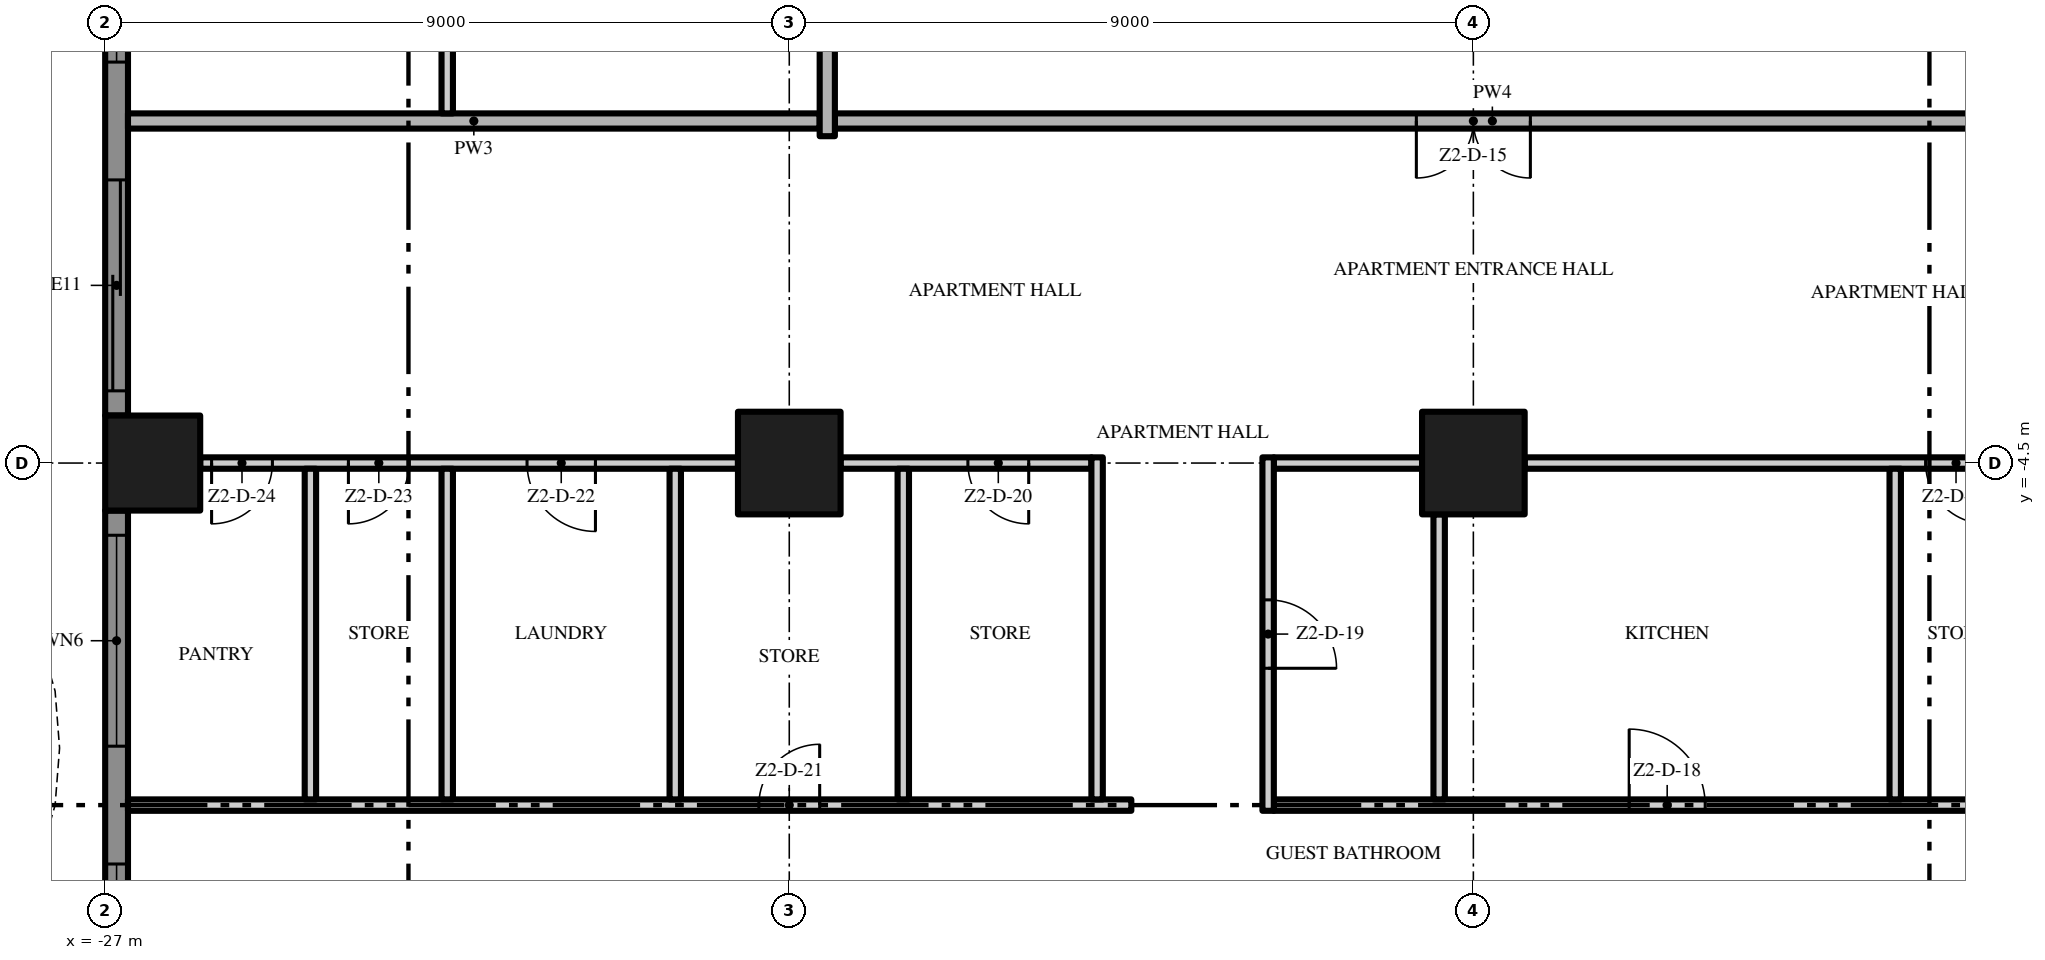
"""IFC4 building model, lengths in metres.
Left out: names, types, materials, properties, quantities, classifications, styles, units other than length and angle.
Written with IfcOpenShell. Run it as: python <this file> out.ifc"""

import sys

from ifc_helpers import new_model, si_unit, direction, frame, frame_2d, origin, origin_2d, place, context, subcontext, project, spatial, polyline, rectangle, outline, extrude, element, fill, save


model = new_model("IFC4")
c1 = context("Model", 3, precision=1e-05, world=origin(), true_north=direction((0.0, 1.0)))
c2 = subcontext(c1, "Body", "Model", "MODEL_VIEW")
j1 = project(units=[si_unit("LENGTHUNIT", "METRE"), si_unit("PLANEANGLEUNIT", "RADIAN")], contexts=[c1])
p1 = place(None, origin())
s1 = spatial("IfcSite", under=j1, at=p1, CompositionType="ELEMENT")
p2 = place(p1, origin())
s2 = spatial("IfcBuilding", under=s1, at=p2, CompositionType="ELEMENT")
p3 = place(p2, frame((0.0, 0.0, 107.4)))
s3 = spatial("IfcBuildingStorey", under=s2, at=p3, CompositionType="ELEMENT", Elevation=107.4)
p4 = place(p3, frame((-18.0, -4.5, 0.0), z_axis=(0.0, 0.0, 1.0), x_axis=(1.0, 0.0, 0.0)))
e1 = element("IfcColumn", 1, at=p4, inside=s3, PredefinedType="COLUMN", context=c2, shape_type="SweptSolid", body=[
    extrude(rectangle(XDim=1.35, YDim=1.35, at=origin_2d()), origin(), (0.0, 0.0, 1.0), 3.5),
])
p5 = place(p3, frame((-26.375, -4.5, 0.0), z_axis=(0.0, 0.0, 1.0), x_axis=(1.0, 0.0, 0.0)))
e2 = element("IfcColumn", 2, at=p5, inside=s3, PredefinedType="COLUMN", context=c2, shape_type="SweptSolid", body=[
    extrude(rectangle(XDim=1.25, YDim=1.25, at=origin_2d()), origin(), (0.0, 0.0, 1.0), 3.5),
])
p6 = place(p3, frame((-9.0, -4.5, 0.0), z_axis=(0.0, 0.0, 1.0), x_axis=(1.0, 0.0, 0.0)))
e3 = element("IfcColumn", 3, at=p6, inside=s3, PredefinedType="COLUMN", context=c2, shape_type="SweptSolid", body=[
    extrude(rectangle(XDim=1.35, YDim=1.35, at=origin_2d()), origin(), (0.0, 0.0, 1.0), 3.5),
])
p7 = place(p3, frame((-26.85, -3.875, 0.0), z_axis=(0.0, 0.0, 1.0), x_axis=(0.0, 1.0, 0.0)))
e4 = element("IfcWall", 4, at=p7, inside=s3, PredefinedType="SOLIDWALL", context=c2, shape_type="SweptSolid", body=[
    extrude(rectangle(XDim=7.75, YDim=0.3, at=frame_2d((3.875, 0.0))), origin(), (0.0, 0.0, 1.0), 3.5),
])
p8 = place(p7, frame((4.65, 0.0, 0.45)))
e5 = element("IfcOpeningElement", 5, at=p8, cuts=e4, PredefinedType="OPENING", context=c2, shape_type="SweptSolid", body=[
    extrude(rectangle(XDim=2.775, YDim=2.65, at=frame_2d((1.387, 1.325))), frame((0.0, 0.16, 0.0), z_axis=(0.0, -1.0, 0.0), x_axis=(1.0, 0.0, 0.0)), (0.0, 0.0, 1.0), 0.32),
])
p9 = place(p7, frame((0.325, 0.0, 0.0)))
e6 = element("IfcOpeningElement", 6, at=p9, cuts=e4, PredefinedType="OPENING", context=c2, shape_type="SweptSolid", body=[
    extrude(rectangle(XDim=2.775, YDim=2.4, at=frame_2d((1.387, 1.2))), frame((0.0, 0.16, 0.0), z_axis=(0.0, -1.0, 0.0), x_axis=(1.0, 0.0, 0.0)), (0.0, 0.0, 1.0), 0.32),
])
p10 = place(p3, frame((-26.85, -12.875, 0.0), z_axis=(0.0, 0.0, 1.0), x_axis=(0.0, 1.0, 0.0)))
e7 = element("IfcWall", 7, at=p10, inside=s3, PredefinedType="SOLIDWALL", context=c2, shape_type="SweptSolid", body=[
    extrude(rectangle(XDim=7.75, YDim=0.3, at=frame_2d((3.875, 0.0))), origin(), (0.0, 0.0, 1.0), 3.5),
])
p11 = place(p10, frame((4.65, 0.0, 0.45)))
e8 = element("IfcOpeningElement", 8, at=p11, cuts=e7, PredefinedType="OPENING", context=c2, shape_type="SweptSolid", body=[
    extrude(rectangle(XDim=2.775, YDim=2.65, at=frame_2d((1.387, 1.325))), frame((0.0, 0.16, 0.0), z_axis=(0.0, -1.0, 0.0), x_axis=(1.0, 0.0, 0.0)), (0.0, 0.0, 1.0), 0.32),
])
p12 = place(p10, frame((0.325, 0.0, 0.45)))
e9 = element("IfcOpeningElement", 9, at=p12, cuts=e7, PredefinedType="OPENING", context=c2, shape_type="SweptSolid", body=[
    extrude(rectangle(XDim=2.775, YDim=2.65, at=frame_2d((1.387, 1.325))), frame((0.0, 0.16, 0.0), z_axis=(0.0, -1.0, 0.0), x_axis=(1.0, 0.0, 0.0)), (0.0, 0.0, 1.0), 0.32),
])
p13 = place(p3, origin())
e10 = element("IfcWall", 10, at=p13, inside=s3, PredefinedType="USERDEFINED", context=c2, shape_type="SweptSolid", body=[
    extrude(outline(polyline([(-28.8, 18.0), (-29.505, 16.5), (-29.941, 15.0), (-30.0, 14.25), (-29.941, 13.5), (-29.505, 12.0), (-28.8, 10.5), (-28.095, 9.0), (-27.659, 7.5), (-27.6, 6.75), (-27.659, 6.0), (-28.095, 4.5), (-28.8, 3.0), (-29.505, 1.5), (-29.941, 0.0), (-30.0, -0.75), (-29.941, -1.5), (-29.505, -3.0), (-28.8, -4.5), (-28.095, -6.0), (-27.659, -7.5), (-27.6, -8.25), (-27.659, -9.0), (-28.095, -10.5), (-28.8, -12.0), (-29.505, -13.5), (-29.941, -15.0), (-30.0, -15.75), (-29.941, -16.5), (-29.505, -18.0), (-29.265, -17.93), (-29.694, -16.455), (-29.749, -15.75), (-29.694, -15.045), (-29.271, -13.589), (-28.574, -12.106), (-27.86, -10.589), (-27.411, -9.045), (-27.349, -8.25), (-27.411, -7.455), (-27.86, -5.911), (-28.574, -4.394), (-29.271, -2.911), (-29.694, -1.455), (-29.749, -0.75), (-29.694, -0.045), (-29.271, 1.411), (-28.574, 2.894), (-27.86, 4.411), (-27.411, 5.955), (-27.349, 6.75), (-27.411, 7.545), (-27.86, 9.089), (-28.574, 10.606), (-29.271, 12.089), (-29.694, 13.545), (-29.749, 14.25), (-29.694, 14.955), (-29.271, 16.411), (-28.574, 17.894), (-28.8, 18.0)])), origin(), (0.0, 0.0, 1.0), 0.9),
])
p14 = place(p3, frame((-26.7, -9.0, 0.0), z_axis=(0.0, 0.0, 1.0), x_axis=(1.0, 0.0, 0.0)))
e11 = element("IfcWall", 11, at=p14, inside=s3, PredefinedType="PARTITIONING", context=c2, shape_type="SweptSolid", body=[
    extrude(rectangle(XDim=13.2, YDim=0.15, at=frame_2d((6.6, 0.0))), origin(), (0.0, 0.0, 1.0), 3.5),
])
p15 = place(p14, frame((8.3, 0.0, 0.0)))
e12 = element("IfcOpeningElement", 12, at=p15, cuts=e11, PredefinedType="OPENING", context=c2, shape_type="SweptSolid", body=[
    extrude(rectangle(XDim=0.8, YDim=2.0, at=frame_2d((0.4, 1.0))), frame((0.0, 0.085, 0.0), z_axis=(0.0, -1.0, 0.0), x_axis=(1.0, 0.0, 0.0)), (0.0, 0.0, 1.0), 0.17),
])
p16 = place(p3, frame((-11.625, -9.0, 0.0), z_axis=(0.0, 0.0, 1.0), x_axis=(1.0, 0.0, 0.0)))
e13 = element("IfcWall", 13, at=p16, inside=s3, PredefinedType="PARTITIONING", context=c2, shape_type="SweptSolid", body=[
    extrude(rectangle(XDim=11.525, YDim=0.15, at=frame_2d((5.763, 0.0))), origin(), (0.0, 0.0, 1.0), 3.5),
])
p17 = place(p16, frame((10.325, 0.0, 0.0)))
e14 = element("IfcOpeningElement", 14, at=p17, cuts=e13, PredefinedType="OPENING", context=c2, shape_type="SweptSolid", body=[
    extrude(rectangle(XDim=0.8, YDim=2.0, at=frame_2d((0.4, 1.0))), frame((0.0, 0.085, 0.0), z_axis=(0.0, -1.0, 0.0), x_axis=(1.0, 0.0, 0.0)), (0.0, 0.0, 1.0), 0.17),
])
p18 = place(p16, frame((4.675, 0.0, 0.0)))
e15 = element("IfcOpeningElement", 15, at=p18, cuts=e13, PredefinedType="OPENING", context=c2, shape_type="SweptSolid", body=[
    extrude(rectangle(XDim=1.0, YDim=2.4, at=frame_2d((0.5, 1.2))), frame((0.0, 0.085, 0.0), z_axis=(0.0, -1.0, 0.0), x_axis=(1.0, 0.0, 0.0)), (0.0, 0.0, 1.0), 0.17),
])
p19 = place(p3, frame((-18.675, -4.5, 0.0), z_axis=(0.0, 0.0, 1.0), x_axis=(-1.0, 0.0, 0.0)))
e16 = element("IfcWall", 16, at=p19, inside=s3, PredefinedType="PARTITIONING", context=c2, shape_type="SweptSolid", body=[
    extrude(rectangle(XDim=7.075, YDim=0.15, at=frame_2d((3.538, 0.0))), origin(), (0.0, 0.0, 1.0), 3.5),
])
p20 = place(p19, frame((1.875, 0.0, 0.0)))
e17 = element("IfcOpeningElement", 17, at=p20, cuts=e16, PredefinedType="OPENING", context=c2, shape_type="SweptSolid", body=[
    extrude(rectangle(XDim=0.9, YDim=2.1, at=frame_2d((0.45, 1.05))), frame((0.0, 0.085, 0.0), z_axis=(0.0, -1.0, 0.0), x_axis=(1.0, 0.0, 0.0)), (0.0, 0.0, 1.0), 0.17),
])
p21 = place(p19, frame((4.325, 0.0, 0.0)))
e18 = element("IfcOpeningElement", 18, at=p21, cuts=e16, PredefinedType="OPENING", context=c2, shape_type="SweptSolid", body=[
    extrude(rectangle(XDim=0.8, YDim=2.0, at=frame_2d((0.4, 1.0))), frame((0.0, 0.085, 0.0), z_axis=(0.0, -1.0, 0.0), x_axis=(1.0, 0.0, 0.0)), (0.0, 0.0, 1.0), 0.17),
])
p22 = place(p19, frame((6.125, 0.0, 0.0)))
e19 = element("IfcOpeningElement", 19, at=p22, cuts=e16, PredefinedType="OPENING", context=c2, shape_type="SweptSolid", body=[
    extrude(rectangle(XDim=0.8, YDim=2.0, at=frame_2d((0.4, 1.0))), frame((0.0, 0.085, 0.0), z_axis=(0.0, -1.0, 0.0), x_axis=(1.0, 0.0, 0.0)), (0.0, 0.0, 1.0), 0.17),
])
p23 = place(p3, frame((-14.025, -4.5, 0.0), z_axis=(0.0, 0.0, 1.0), x_axis=(-1.0, 0.0, 0.0)))
e20 = element("IfcWall", 20, at=p23, inside=s3, PredefinedType="PARTITIONING", context=c2, shape_type="SweptSolid", body=[
    extrude(rectangle(XDim=3.3, YDim=0.15, at=frame_2d((1.65, 0.0))), origin(), (0.0, 0.0, 1.0), 3.5),
])
p24 = place(p23, frame((0.825, 0.0, 0.0)))
e21 = element("IfcOpeningElement", 21, at=p24, cuts=e20, PredefinedType="OPENING", context=c2, shape_type="SweptSolid", body=[
    extrude(rectangle(XDim=0.8, YDim=2.0, at=frame_2d((0.4, 1.0))), frame((0.0, 0.085, 0.0), z_axis=(0.0, -1.0, 0.0), x_axis=(1.0, 0.0, 0.0)), (0.0, 0.0, 1.0), 0.17),
])
p25 = place(p3, frame((-11.625, -4.5, 0.0), z_axis=(0.0, 0.0, 1.0), x_axis=(1.0, 0.0, 0.0)))
e22 = element("IfcWall", 22, at=p25, inside=s3, PredefinedType="PARTITIONING", context=c2, shape_type="SweptSolid", body=[
    extrude(rectangle(XDim=1.95, YDim=0.15, at=frame_2d((0.975, 0.0))), origin(), (0.0, 0.0, 1.0), 3.5),
])
p26 = place(p3, frame((-0.675, -4.5, 0.0), z_axis=(0.0, 0.0, 1.0), x_axis=(-1.0, 0.0, 0.0)))
e23 = element("IfcWall", 23, at=p26, inside=s3, PredefinedType="PARTITIONING", context=c2, shape_type="SweptSolid", body=[
    extrude(rectangle(XDim=7.65, YDim=0.15, at=frame_2d((3.825, 0.0))), origin(), (0.0, 0.0, 1.0), 3.5),
])
p27 = place(p26, frame((1.575, 0.0, 0.0)))
e24 = element("IfcOpeningElement", 24, at=p27, cuts=e23, PredefinedType="OPENING", context=c2, shape_type="SweptSolid", body=[
    extrude(rectangle(XDim=0.8, YDim=2.0, at=frame_2d((0.4, 1.0))), frame((0.0, 0.085, 0.0), z_axis=(0.0, -1.0, 0.0), x_axis=(1.0, 0.0, 0.0)), (0.0, 0.0, 1.0), 0.17),
])
p28 = place(p3, frame((-0.1, 0.0, 0.0), z_axis=(0.0, 0.0, 1.0), x_axis=(-1.0, 0.0, 0.0)))
e25 = element("IfcWall", 25, at=p28, inside=s3, PredefinedType="PARTITIONING", context=c2, shape_type="SweptSolid", body=[
    extrude(rectangle(XDim=17.3, YDim=0.2, at=frame_2d((8.65, 0.0))), origin(), (0.0, 0.0, 1.0), 3.5),
])
p29 = place(p28, frame((8.15, 0.0, 0.0)))
e26 = element("IfcOpeningElement", 26, at=p29, cuts=e25, PredefinedType="OPENING", context=c2, shape_type="SweptSolid", body=[
    extrude(rectangle(XDim=1.5, YDim=2.4, at=frame_2d((0.75, 1.2))), frame((0.0, 0.11, 0.0), z_axis=(0.0, -1.0, 0.0), x_axis=(1.0, 0.0, 0.0)), (0.0, 0.0, 1.0), 0.22),
])
p30 = place(p3, frame((-26.7, 0.0, 0.0), z_axis=(0.0, 0.0, 1.0), x_axis=(1.0, 0.0, 0.0)))
e27 = element("IfcWall", 27, at=p30, inside=s3, PredefinedType="PARTITIONING", context=c2, shape_type="SweptSolid", body=[
    extrude(rectangle(XDim=9.1, YDim=0.2, at=frame_2d((4.55, 0.0))), origin(), (0.0, 0.0, 1.0), 3.5),
])
for number, where, z_axis, x_axis in (
    (28, (-24.3, -8.925, 0.0), (0.0, 0.0, 1.0), (0.0, 1.0, 0.0)),
    (29, (-22.5, -8.925, 0.0), (0.0, 0.0, 1.0), (0.0, 1.0, 0.0)),
):
    element("IfcWall", number, at=place(p3, frame(where, z_axis=z_axis, x_axis=x_axis)), inside=s3, PredefinedType="PARTITIONING", context=c2, shape_type="SweptSolid", body=[
        extrude(rectangle(XDim=4.35, YDim=0.15, at=frame_2d((2.175, 0.0))), origin(), (0.0, 0.0, 1.0), 3.5),
    ])
p31 = place(p3, frame((-22.5, 0.1, 0.0), z_axis=(0.0, 0.0, 1.0), x_axis=(0.0, 1.0, 0.0)))
e30 = element("IfcWall", 30, at=p31, inside=s3, PredefinedType="PARTITIONING", context=c2, shape_type="SweptSolid", body=[
    extrude(rectangle(XDim=17.275, YDim=0.15, at=frame_2d((8.637, 0.0))), origin(), (0.0, 0.0, 1.0), 3.5),
])
p32 = place(p31, frame((1.65, 0.0, 0.0)))
e31 = element("IfcOpeningElement", 31, at=p32, cuts=e30, PredefinedType="OPENING", context=c2, shape_type="SweptSolid", body=[
    extrude(rectangle(XDim=1.0, YDim=2.4, at=frame_2d((0.5, 1.2))), frame((0.0, 0.085, 0.0), z_axis=(0.0, -1.0, 0.0), x_axis=(1.0, 0.0, 0.0)), (0.0, 0.0, 1.0), 0.17),
])
p33 = place(p31, frame((8.0, 0.0, 0.0)))
e32 = element("IfcOpeningElement", 32, at=p33, cuts=e30, PredefinedType="OPENING", context=c2, shape_type="SweptSolid", body=[
    extrude(rectangle(XDim=1.8, YDim=2.4, at=frame_2d((0.9, 1.2))), frame((0.0, 0.085, 0.0), z_axis=(0.0, -1.0, 0.0), x_axis=(1.0, 0.0, 0.0)), (0.0, 0.0, 1.0), 0.17),
])
p34 = place(p3, frame((-19.5, -8.925, 0.0), z_axis=(0.0, 0.0, 1.0), x_axis=(0.0, 1.0, 0.0)))
e33 = element("IfcWall", 33, at=p34, inside=s3, PredefinedType="PARTITIONING", context=c2, shape_type="SweptSolid", body=[
    extrude(rectangle(XDim=4.35, YDim=0.15, at=frame_2d((2.175, 0.0))), origin(), (0.0, 0.0, 1.0), 3.5),
])
p35 = place(p3, frame((-17.5, -0.2, 0.0), z_axis=(0.0, 0.0, 1.0), x_axis=(0.0, 1.0, 0.0)))
e34 = element("IfcWall", 34, at=p35, inside=s3, PredefinedType="PARTITIONING", context=c2, shape_type="SweptSolid", body=[
    extrude(rectangle(XDim=4.025, YDim=0.2, at=frame_2d((2.013, 0.0))), origin(), (0.0, 0.0, 1.0), 3.5),
])
p36 = place(p3, frame((-16.5, -8.925, 0.0), z_axis=(0.0, 0.0, 1.0), x_axis=(0.0, 1.0, 0.0)))
e35 = element("IfcWall", 35, at=p36, inside=s3, PredefinedType="PARTITIONING", context=c2, shape_type="SweptSolid", body=[
    extrude(rectangle(XDim=4.35, YDim=0.15, at=frame_2d((2.175, 0.0))), origin(), (0.0, 0.0, 1.0), 3.5),
])
p37 = place(p3, frame((-13.95, -8.925, 0.0), z_axis=(0.0, 0.0, 1.0), x_axis=(0.0, 1.0, 0.0)))
e36 = element("IfcWall", 36, at=p37, inside=s3, PredefinedType="PARTITIONING", context=c2, shape_type="SweptSolid", body=[
    extrude(rectangle(XDim=4.5, YDim=0.15, at=frame_2d((2.25, 0.0))), origin(), (0.0, 0.0, 1.0), 3.5),
])
p38 = place(p3, frame((-11.7, -4.425, 0.0), z_axis=(0.0, 0.0, 1.0), x_axis=(0.0, -1.0, 0.0)))
e37 = element("IfcWall", 37, at=p38, inside=s3, PredefinedType="PARTITIONING", context=c2, shape_type="SweptSolid", body=[
    extrude(rectangle(XDim=4.65, YDim=0.15, at=frame_2d((2.325, 0.0))), origin(), (0.0, 0.0, 1.0), 3.5),
])
p39 = place(p38, frame((1.875, 0.0, 0.0)))
e38 = element("IfcOpeningElement", 38, at=p39, cuts=e37, PredefinedType="OPENING", context=c2, shape_type="SweptSolid", body=[
    extrude(rectangle(XDim=0.9, YDim=2.1, at=frame_2d((0.45, 1.05))), frame((0.0, 0.085, 0.0), z_axis=(0.0, -1.0, 0.0), x_axis=(1.0, 0.0, 0.0)), (0.0, 0.0, 1.0), 0.17),
])
p40 = place(p3, frame((-9.45, -8.925, 0.0), z_axis=(0.0, 0.0, 1.0), x_axis=(0.0, 1.0, 0.0)))
e39 = element("IfcWall", 39, at=p40, inside=s3, PredefinedType="PARTITIONING", context=c2, shape_type="SweptSolid", body=[
    extrude(rectangle(XDim=3.75, YDim=0.15, at=frame_2d((1.875, 0.0))), origin(), (0.0, 0.0, 1.0), 3.5),
])
p41 = place(p3, frame((-3.45, -8.925, 0.0), z_axis=(0.0, 0.0, 1.0), x_axis=(0.0, 1.0, 0.0)))
e40 = element("IfcWall", 40, at=p41, inside=s3, PredefinedType="PARTITIONING", context=c2, shape_type="SweptSolid", body=[
    extrude(rectangle(XDim=4.35, YDim=0.15, at=frame_2d((2.175, 0.0))), origin(), (0.0, 0.0, 1.0), 3.5),
])
p42 = place(p8, origin())
e41 = element("IfcWindow", 41, at=p42, inside=s3, PartitioningType="SINGLE_PANEL", PredefinedType="WINDOW", context=c2, shape_type="SweptSolid", body=[
    extrude(rectangle(XDim=2.775, YDim=2.65, at=frame_2d((1.387, 1.325))), frame((0.0, 0.03, 0.0), z_axis=(0.0, -1.0, 0.0), x_axis=(1.0, 0.0, 0.0)), (0.0, 0.0, 1.0), 0.06),
])
fill(e5, e41)
p43 = place(p9, origin())
e42 = element("IfcDoor", 42, at=p43, inside=s3, OperationType="SINGLE_SWING_LEFT", PredefinedType="DOOR", context=c2, shape_type="SweptSolid", body=[
    extrude(rectangle(XDim=2.775, YDim=2.4, at=frame_2d((1.387, 1.2))), frame((0.0, 0.025, 0.0), z_axis=(0.0, -1.0, 0.0), x_axis=(1.0, 0.0, 0.0)), (0.0, 0.0, 1.0), 0.05),
])
fill(e6, e42)
p44 = place(p11, origin())
e43 = element("IfcWindow", 43, at=p44, inside=s3, PartitioningType="SINGLE_PANEL", PredefinedType="WINDOW", context=c2, shape_type="SweptSolid", body=[
    extrude(rectangle(XDim=2.775, YDim=2.65, at=frame_2d((1.387, 1.325))), frame((0.0, 0.03, 0.0), z_axis=(0.0, -1.0, 0.0), x_axis=(1.0, 0.0, 0.0)), (0.0, 0.0, 1.0), 0.06),
])
fill(e8, e43)
p45 = place(p12, origin())
e44 = element("IfcWindow", 44, at=p45, inside=s3, PartitioningType="SINGLE_PANEL", PredefinedType="WINDOW", context=c2, shape_type="SweptSolid", body=[
    extrude(rectangle(XDim=2.775, YDim=2.65, at=frame_2d((1.387, 1.325))), frame((0.0, 0.03, 0.0), z_axis=(0.0, -1.0, 0.0), x_axis=(1.0, 0.0, 0.0)), (0.0, 0.0, 1.0), 0.06),
])
fill(e9, e44)
p46 = place(p29, origin())
e45 = element("IfcDoor", 45, at=p46, inside=s3, OperationType="DOUBLE_DOOR_SINGLE_SWING", PredefinedType="DOOR", context=c2, shape_type="SweptSolid", body=[
    extrude(rectangle(XDim=1.5, YDim=2.4, at=frame_2d((0.75, 1.2))), frame((0.0, 0.025, 0.0), z_axis=(0.0, -1.0, 0.0), x_axis=(1.0, 0.0, 0.0)), (0.0, 0.0, 1.0), 0.05),
])
fill(e26, e45)
p47 = place(p27, origin())
e46 = element("IfcDoor", 46, at=p47, inside=s3, OperationType="SINGLE_SWING_LEFT", PredefinedType="DOOR", context=c2, shape_type="SweptSolid", body=[
    extrude(rectangle(XDim=0.8, YDim=2.0, at=frame_2d((0.4, 1.0))), frame((0.0, 0.025, 0.0), z_axis=(0.0, -1.0, 0.0), x_axis=(1.0, 0.0, 0.0)), (0.0, 0.0, 1.0), 0.05),
])
fill(e24, e46)
p48 = place(p18, origin())
e47 = element("IfcDoor", 47, at=p48, inside=s3, OperationType="SINGLE_SWING_LEFT", PredefinedType="DOOR", context=c2, shape_type="SweptSolid", body=[
    extrude(rectangle(XDim=1.0, YDim=2.4, at=frame_2d((0.5, 1.2))), frame((0.0, 0.025, 0.0), z_axis=(0.0, -1.0, 0.0), x_axis=(1.0, 0.0, 0.0)), (0.0, 0.0, 1.0), 0.05),
])
fill(e15, e47)
p49 = place(p39, origin())
e48 = element("IfcDoor", 48, at=p49, inside=s3, OperationType="SINGLE_SWING_RIGHT", PredefinedType="DOOR", context=c2, shape_type="SweptSolid", body=[
    extrude(rectangle(XDim=0.9, YDim=2.1, at=frame_2d((0.45, 1.05))), frame((0.0, 0.025, 0.0), z_axis=(0.0, -1.0, 0.0), x_axis=(1.0, 0.0, 0.0)), (0.0, 0.0, 1.0), 0.05),
])
fill(e38, e48)
p50 = place(p24, origin())
e49 = element("IfcDoor", 49, at=p50, inside=s3, OperationType="SINGLE_SWING_LEFT", PredefinedType="DOOR", context=c2, shape_type="SweptSolid", body=[
    extrude(rectangle(XDim=0.8, YDim=2.0, at=frame_2d((0.4, 1.0))), frame((0.0, 0.025, 0.0), z_axis=(0.0, -1.0, 0.0), x_axis=(1.0, 0.0, 0.0)), (0.0, 0.0, 1.0), 0.05),
])
fill(e21, e49)
p51 = place(p15, origin())
e50 = element("IfcDoor", 50, at=p51, inside=s3, OperationType="SINGLE_SWING_RIGHT", PredefinedType="DOOR", context=c2, shape_type="SweptSolid", body=[
    extrude(rectangle(XDim=0.8, YDim=2.0, at=frame_2d((0.4, 1.0))), frame((0.0, 0.025, 0.0), z_axis=(0.0, -1.0, 0.0), x_axis=(1.0, 0.0, 0.0)), (0.0, 0.0, 1.0), 0.05),
])
fill(e12, e50)
p52 = place(p20, origin())
e51 = element("IfcDoor", 51, at=p52, inside=s3, OperationType="SINGLE_SWING_LEFT", PredefinedType="DOOR", context=c2, shape_type="SweptSolid", body=[
    extrude(rectangle(XDim=0.9, YDim=2.1, at=frame_2d((0.45, 1.05))), frame((0.0, 0.025, 0.0), z_axis=(0.0, -1.0, 0.0), x_axis=(1.0, 0.0, 0.0)), (0.0, 0.0, 1.0), 0.05),
])
fill(e17, e51)
p53 = place(p21, origin())
e52 = element("IfcDoor", 52, at=p53, inside=s3, OperationType="SINGLE_SWING_RIGHT", PredefinedType="DOOR", context=c2, shape_type="SweptSolid", body=[
    extrude(rectangle(XDim=0.8, YDim=2.0, at=frame_2d((0.4, 1.0))), frame((0.0, 0.025, 0.0), z_axis=(0.0, -1.0, 0.0), x_axis=(1.0, 0.0, 0.0)), (0.0, 0.0, 1.0), 0.05),
])
fill(e18, e52)
p54 = place(p22, origin())
e53 = element("IfcDoor", 53, at=p54, inside=s3, OperationType="SINGLE_SWING_RIGHT", PredefinedType="DOOR", context=c2, shape_type="SweptSolid", body=[
    extrude(rectangle(XDim=0.8, YDim=2.0, at=frame_2d((0.4, 1.0))), frame((0.0, 0.025, 0.0), z_axis=(0.0, -1.0, 0.0), x_axis=(1.0, 0.0, 0.0)), (0.0, 0.0, 1.0), 0.05),
])
fill(e19, e53)
save(model, sys.argv[1])
